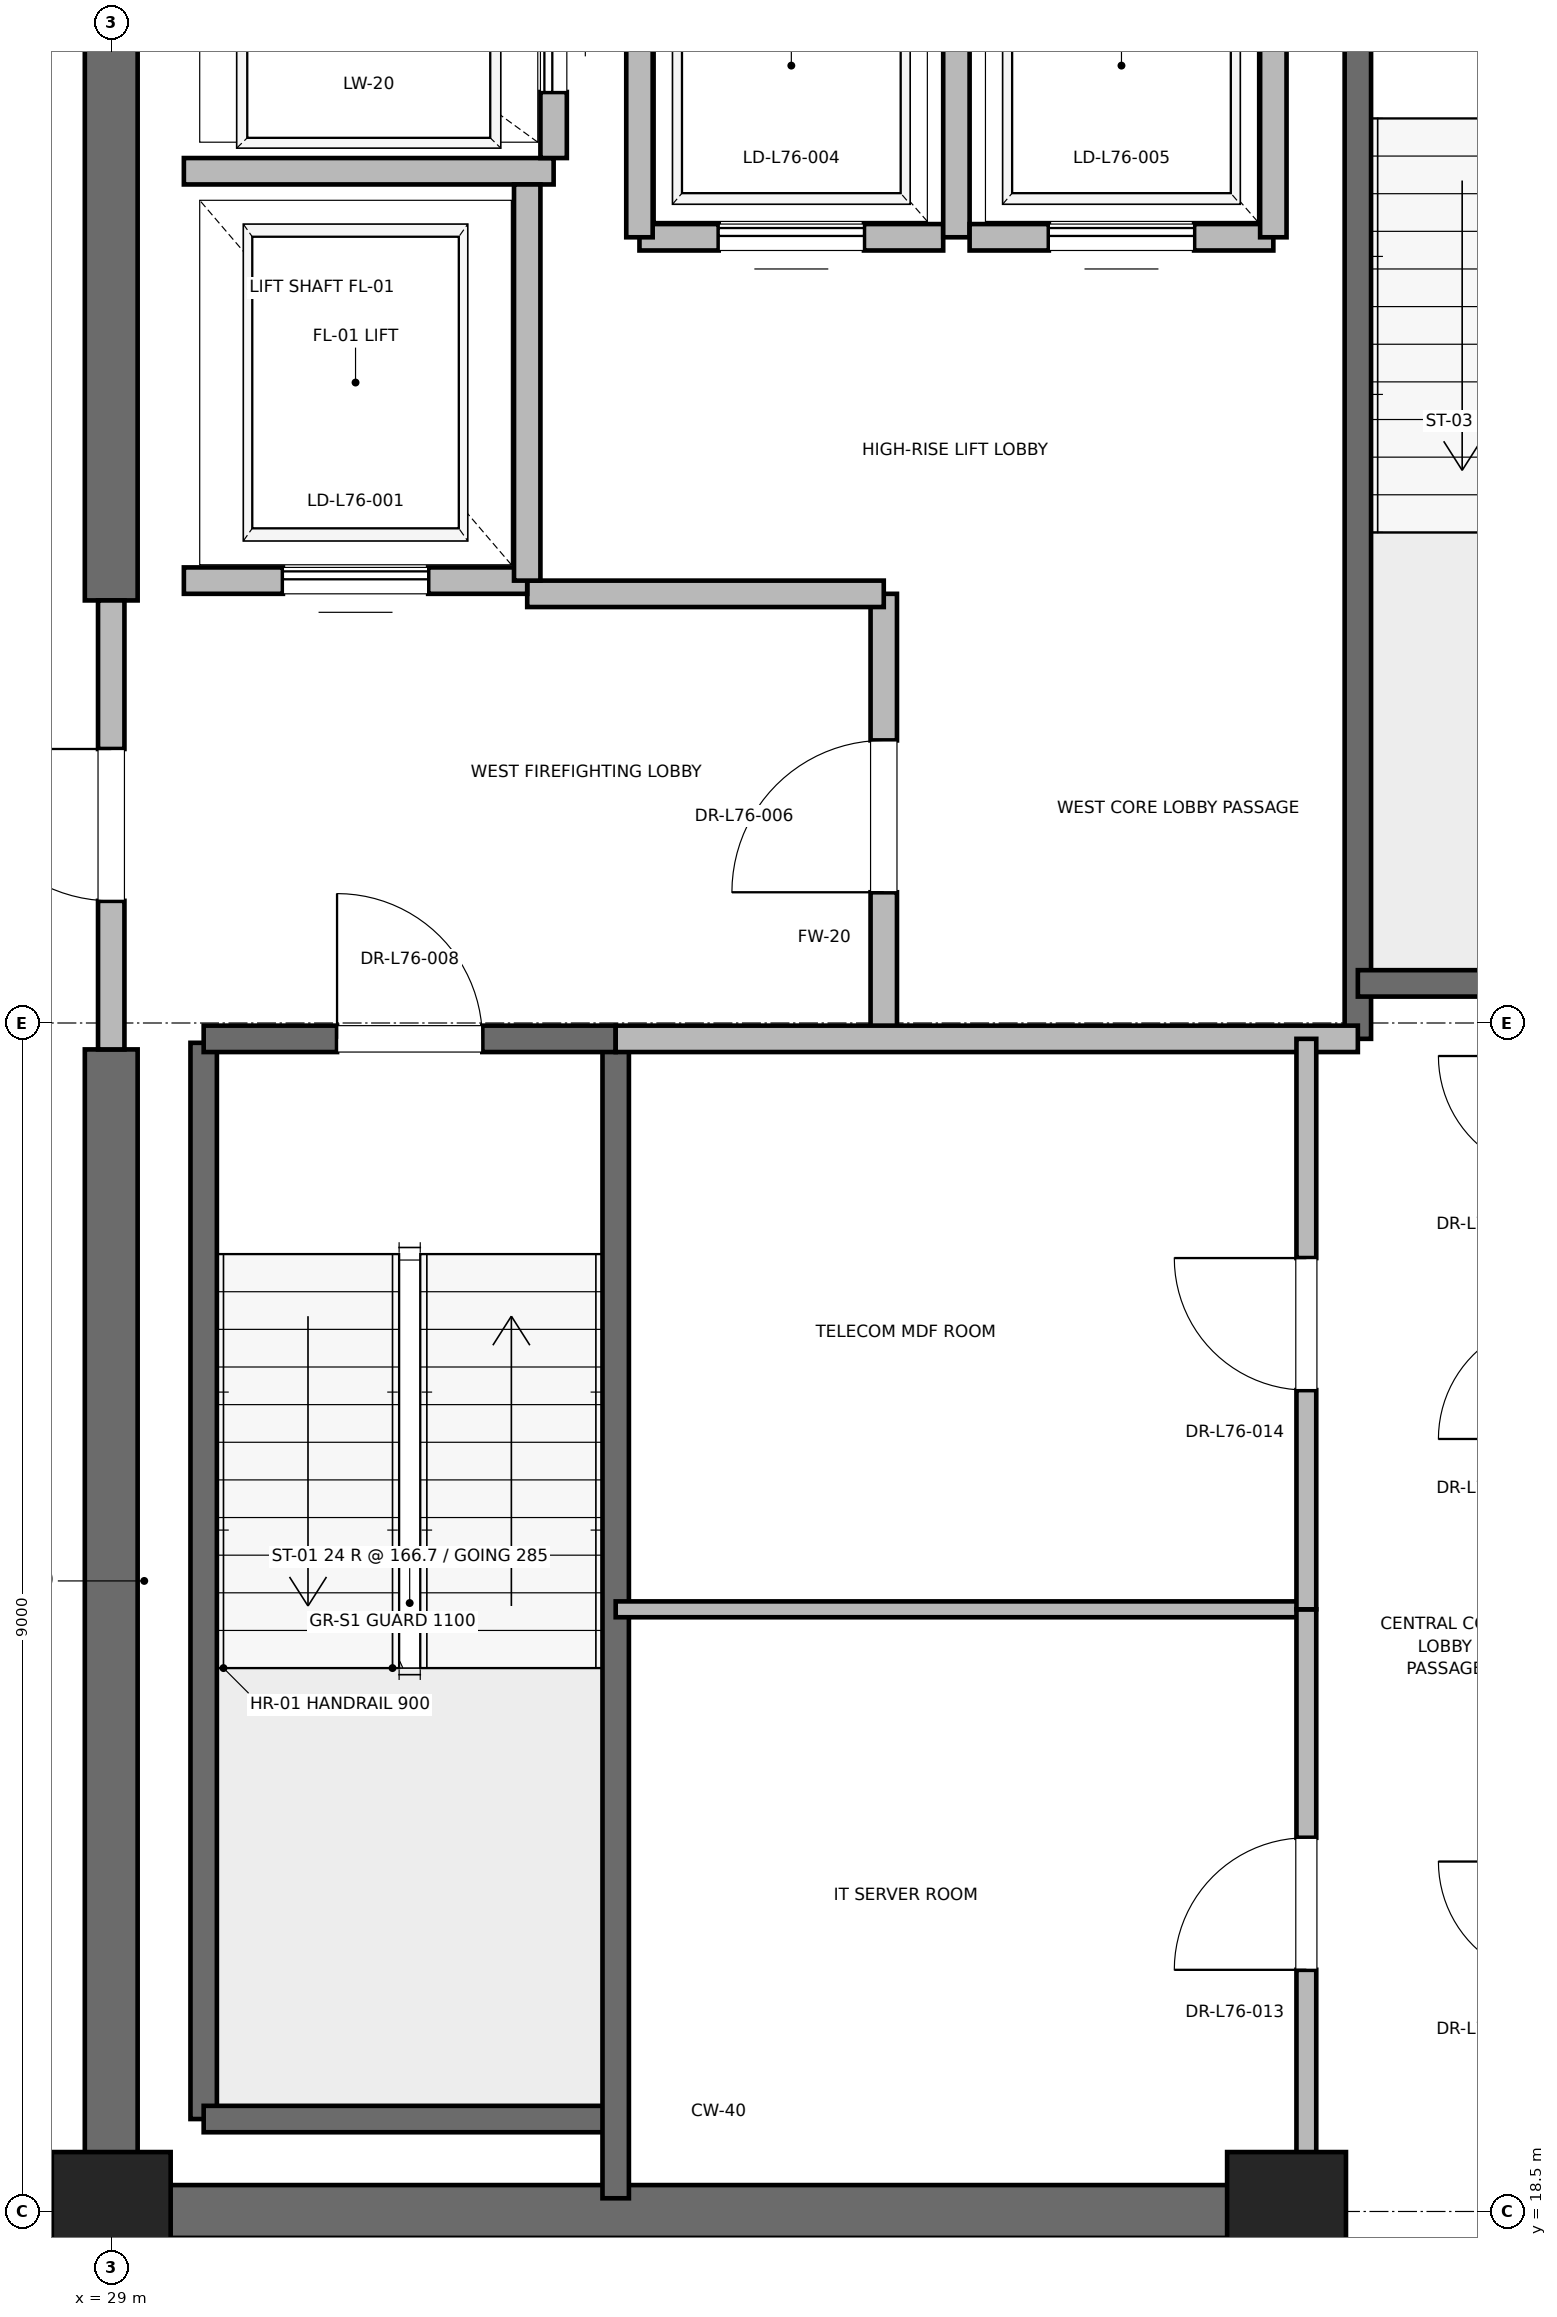
"""IFC4 building model, lengths in metres.
Left out: names, types, materials, properties, quantities, classifications, styles, units other than length and angle.
Written with IfcOpenShell. Run it as: python <this file> out.ifc"""

import sys

from ifc_helpers import new_model, si_unit, direction, frame, frame_2d, origin, origin_2d, place, context, subcontext, project, spatial, rectangle, extrude, element, fill, save


model = new_model("IFC4")
c1 = context("Model", 3, precision=1e-05, world=origin(), true_north=direction((0.0, 1.0)))
c2 = subcontext(c1, "Body", "Model", "MODEL_VIEW")
j1 = project(units=[si_unit("LENGTHUNIT", "METRE"), si_unit("PLANEANGLEUNIT", "RADIAN")], contexts=[c1])
p1 = place(None, origin())
s1 = spatial("IfcSite", under=j1, at=p1, CompositionType="ELEMENT")
p2 = place(p1, origin())
s2 = spatial("IfcBuilding", under=s1, at=p2, CompositionType="ELEMENT")
p3 = place(p2, frame((0.0, 0.0, 326.8)))
s3 = spatial("IfcBuildingStorey", under=s2, at=p3, CompositionType="ELEMENT", Elevation=326.8)
for number, where, z_axis, x_axis in (
    (1, (29.0, 18.5, 0.0), (0.0, 0.0, 1.0), (1.0, 0.0, 0.0)),
    (2, (37.9, 18.5, 0.0), (0.0, 0.0, 1.0), (1.0, 0.0, 0.0)),
):
    element("IfcColumn", number, at=place(p3, frame(where, z_axis=z_axis, x_axis=x_axis)), inside=s3, PredefinedType="PILASTER", context=c2, shape_type="SweptSolid", body=[
        extrude(rectangle(XDim=0.9, YDim=0.9, at=origin_2d()), origin(), (0.0, 0.0, 1.0), 4.0),
    ])
p4 = place(p3, frame((29.0, 18.5, 0.0), z_axis=(0.0, 0.0, 1.0), x_axis=(1.0, 0.0, 0.0)))
e3 = element("IfcWall", 3, at=p4, inside=s3, PredefinedType="SHEAR", context=c2, shape_type="SweptSolid", body=[
    extrude(rectangle(XDim=9.2, YDim=0.4, at=frame_2d((4.6, 0.0))), origin(), (0.0, 0.0, 1.0), 3.785),
])
p5 = place(p3, frame((29.0, 18.5, 0.0), z_axis=(0.0, 0.0, 1.0), x_axis=(0.0, 1.0, 0.0)))
e4 = element("IfcWall", 4, at=p5, inside=s3, PredefinedType="SHEAR", context=c2, shape_type="SweptSolid", body=[
    extrude(rectangle(XDim=8.8, YDim=0.4, at=frame_2d((4.4, 0.0))), origin(), (0.0, 0.0, 1.0), 3.785),
])
p6 = place(p3, frame((29.0, 30.7, 0.0), z_axis=(0.0, 0.0, 1.0), x_axis=(0.0, 1.0, 0.0)))
e5 = element("IfcWall", 5, at=p6, inside=s3, PredefinedType="SHEAR", context=c2, shape_type="SweptSolid", body=[
    extrude(rectangle(XDim=5.8, YDim=0.4, at=frame_2d((2.9, 0.0))), origin(), (0.0, 0.0, 1.0), 3.785),
])
p7 = place(p3, frame((29.7, 19.2, 0.0), z_axis=(0.0, 0.0, 1.0), x_axis=(0.0, 1.0, 0.0)))
e6 = element("IfcWall", 6, at=p7, inside=s3, PredefinedType="SOLIDWALL", context=c2, shape_type="SweptSolid", body=[
    extrude(rectangle(XDim=8.15, YDim=0.2, at=frame_2d((4.075, 0.0))), origin(), (0.0, 0.0, 1.0), 3.785),
])
p8 = place(p3, frame((29.7, 19.2, 0.0), z_axis=(0.0, 0.0, 1.0), x_axis=(1.0, 0.0, 0.0)))
e7 = element("IfcWall", 7, at=p8, inside=s3, PredefinedType="SOLIDWALL", context=c2, shape_type="SweptSolid", body=[
    extrude(rectangle(XDim=3.12, YDim=0.2, at=frame_2d((1.56, 0.0))), origin(), (0.0, 0.0, 1.0), 3.785),
])
p9 = place(p3, frame((32.82, 18.6, 0.0), z_axis=(0.0, 0.0, 1.0), x_axis=(0.0, 1.0, 0.0)))
e8 = element("IfcWall", 8, at=p9, inside=s3, PredefinedType="SOLIDWALL", context=c2, shape_type="SweptSolid", body=[
    extrude(rectangle(XDim=8.78, YDim=0.2, at=frame_2d((4.39, 0.0))), origin(), (0.0, 0.0, 1.0), 3.785),
])
p10 = place(p3, frame((29.7, 27.38, 0.0), z_axis=(0.0, 0.0, 1.0), x_axis=(1.0, 0.0, 0.0)))
e9 = element("IfcWall", 9, at=p10, inside=s3, PredefinedType="SOLIDWALL", context=c2, shape_type="SweptSolid", body=[
    extrude(rectangle(XDim=3.12, YDim=0.2, at=frame_2d((1.56, 0.0))), origin(), (0.0, 0.0, 1.0), 3.785),
])
p11 = place(p10, frame((1.01, 0.0, 0.0)))
e10 = element("IfcOpeningElement", 10, at=p11, cuts=e9, PredefinedType="OPENING", context=c2, shape_type="SweptSolid", body=[
    extrude(rectangle(XDim=1.1, YDim=2.15, at=frame_2d((0.55, 1.075))), frame((0.0, 0.1, 0.0), z_axis=(0.0, -1.0, 0.0), x_axis=(1.0, 0.0, 0.0)), (0.0, 0.0, 1.0), 0.2),
])
p12 = place(p3, frame((38.44, 27.38, 0.0), z_axis=(0.0, 0.0, 1.0), x_axis=(0.0, 1.0, 0.0)))
e11 = element("IfcWall", 11, at=p12, inside=s3, PredefinedType="SOLIDWALL", context=c2, shape_type="SweptSolid", body=[
    extrude(rectangle(XDim=8.87, YDim=0.2, at=frame_2d((4.435, 0.0))), origin(), (0.0, 0.0, 1.0), 3.785),
])
p13 = place(p3, frame((38.44, 27.8, 0.0), z_axis=(0.0, 0.0, 1.0), x_axis=(1.0, 0.0, 0.0)))
e12 = element("IfcWall", 12, at=p13, inside=s3, PredefinedType="SOLIDWALL", context=c2, shape_type="SweptSolid", body=[
    extrude(rectangle(XDim=3.32, YDim=0.2, at=frame_2d((1.66, 0.0))), origin(), (0.0, 0.0, 1.0), 3.785),
])
p14 = place(p3, frame((34.85, 27.38, 0.0), z_axis=(0.0, 0.0, 1.0), x_axis=(0.0, 1.0, 0.0)))
e13 = element("IfcWall", 13, at=p14, inside=s3, PredefinedType="PARTITIONING", context=c2, shape_type="SweptSolid", body=[
    extrude(rectangle(XDim=3.37, YDim=0.2, at=frame_2d((1.685, 0.0))), origin(), (0.0, 0.0, 1.0), 3.785),
])
p15 = place(p14, frame((1.11, 0.0, 0.0)))
e14 = element("IfcOpeningElement", 14, at=p15, cuts=e13, PredefinedType="OPENING", context=c2, shape_type="SweptSolid", body=[
    extrude(rectangle(XDim=1.15, YDim=2.2, at=frame_2d((0.575, 1.1))), frame((0.0, 0.1, 0.0), z_axis=(0.0, -1.0, 0.0), x_axis=(1.0, 0.0, 0.0)), (0.0, 0.0, 1.0), 0.2),
])
p16 = place(p3, frame((29.0, 27.3, 0.0), z_axis=(0.0, 0.0, 1.0), x_axis=(0.0, 1.0, 0.0)))
e15 = element("IfcWall", 15, at=p16, inside=s3, PredefinedType="PARTITIONING", context=c2, shape_type="SweptSolid", body=[
    extrude(rectangle(XDim=3.4, YDim=0.2, at=frame_2d((1.7, 0.0))), origin(), (0.0, 0.0, 1.0), 2.865),
])
p17 = place(p16, frame((1.125, 0.0, 0.0)))
e16 = element("IfcOpeningElement", 16, at=p17, cuts=e15, PredefinedType="OPENING", context=c2, shape_type="SweptSolid", body=[
    extrude(rectangle(XDim=1.15, YDim=2.2, at=frame_2d((0.575, 1.1))), frame((0.0, 0.1, 0.0), z_axis=(0.0, -1.0, 0.0), x_axis=(1.0, 0.0, 0.0)), (0.0, 0.0, 1.0), 0.2),
])
p18 = place(p3, frame((32.82, 27.38, 0.0), z_axis=(0.0, 0.0, 1.0), x_axis=(1.0, 0.0, 0.0)))
e17 = element("IfcWall", 17, at=p18, inside=s3, PredefinedType="PARTITIONING", context=c2, shape_type="SweptSolid", body=[
    extrude(rectangle(XDim=5.62, YDim=0.2, at=frame_2d((2.81, 0.0))), origin(), (0.0, 0.0, 1.0), 3.785),
])
p19 = place(p3, frame((32.15, 30.75, 0.0), z_axis=(0.0, 0.0, 1.0), x_axis=(1.0, 0.0, 0.0)))
e18 = element("IfcWall", 18, at=p19, inside=s3, PredefinedType="PARTITIONING", context=c2, shape_type="SweptSolid", body=[
    extrude(rectangle(XDim=2.7, YDim=0.2, at=frame_2d((1.35, 0.0))), origin(), (0.0, 0.0, 1.0), 3.785),
])
p20 = place(p3, frame((29.55, 30.85, 0.0), z_axis=(0.0, 0.0, 1.0), x_axis=(1.0, 0.0, 0.0)))
e19 = element("IfcWall", 19, at=p20, inside=s3, PredefinedType="SOLIDWALL", context=c2, shape_type="SweptSolid", body=[
    extrude(rectangle(XDim=2.6, YDim=0.2, at=frame_2d((1.3, 0.0))), origin(), (0.0, 0.0, 1.0), 2.865),
])
p21 = place(p20, frame((0.75, 0.0, 0.0)))
e20 = element("IfcOpeningElement", 20, at=p21, cuts=e19, PredefinedType="OPENING", context=c2, shape_type="SweptSolid", body=[
    extrude(rectangle(XDim=1.1, YDim=2.2, at=frame_2d((0.55, 1.1))), frame((0.0, 0.1, 0.0), z_axis=(0.0, -1.0, 0.0), x_axis=(1.0, 0.0, 0.0)), (0.0, 0.0, 1.0), 0.2),
])
p22 = place(p3, frame((29.55, 33.95, 0.0), z_axis=(0.0, 0.0, 1.0), x_axis=(1.0, 0.0, 0.0)))
e21 = element("IfcWall", 21, at=p22, inside=s3, PredefinedType="SOLIDWALL", context=c2, shape_type="SweptSolid", body=[
    extrude(rectangle(XDim=2.8, YDim=0.2, at=frame_2d((1.4, 0.0))), origin(), (0.0, 0.0, 1.0), 3.785),
])
p23 = place(p3, frame((32.15, 30.85, 0.0), z_axis=(0.0, 0.0, 1.0), x_axis=(0.0, 1.0, 0.0)))
e22 = element("IfcWall", 22, at=p23, inside=s3, PredefinedType="SOLIDWALL", context=c2, shape_type="SweptSolid", body=[
    extrude(rectangle(XDim=3.0, YDim=0.2, at=frame_2d((1.5, 0.0))), origin(), (0.0, 0.0, 1.0), 3.785),
])
p24 = place(p3, frame((32.35, 34.05, 0.0), z_axis=(0.0, 0.0, 1.0), x_axis=(0.0, 1.0, 0.0)))
e23 = element("IfcWall", 23, at=p24, inside=s3, PredefinedType="SOLIDWALL", context=c2, shape_type="SweptSolid", body=[
    extrude(rectangle(XDim=2.1, YDim=0.2, at=frame_2d((1.05, 0.0))), origin(), (0.0, 0.0, 1.0), 3.785),
])
p25 = place(p24, frame((0.5, 0.0, 0.0)))
e24 = element("IfcOpeningElement", 24, at=p25, cuts=e23, PredefinedType="OPENING", context=c2, shape_type="SweptSolid", body=[
    extrude(rectangle(XDim=1.1, YDim=2.2, at=frame_2d((0.55, 1.1))), frame((0.0, 0.1, 0.0), z_axis=(0.0, -1.0, 0.0), x_axis=(1.0, 0.0, 0.0)), (0.0, 0.0, 1.0), 0.2),
])
p26 = place(p3, frame((33.0, 33.45, 0.0), z_axis=(0.0, 0.0, 1.0), x_axis=(1.0, 0.0, 0.0)))
e25 = element("IfcWall", 25, at=p26, inside=s3, PredefinedType="SOLIDWALL", context=c2, shape_type="SweptSolid", body=[
    extrude(rectangle(XDim=2.3, YDim=0.2, at=frame_2d((1.15, 0.0))), origin(), (0.0, 0.0, 1.0), 3.785),
])
p27 = place(p26, frame((0.6, 0.0, 0.0)))
e26 = element("IfcOpeningElement", 26, at=p27, cuts=e25, PredefinedType="OPENING", context=c2, shape_type="SweptSolid", body=[
    extrude(rectangle(XDim=1.1, YDim=2.2, at=frame_2d((0.55, 1.1))), frame((0.0, 0.1, 0.0), z_axis=(0.0, -1.0, 0.0), x_axis=(1.0, 0.0, 0.0)), (0.0, 0.0, 1.0), 0.2),
])
p28 = place(p3, frame((33.0, 36.05, 0.0), z_axis=(0.0, 0.0, 1.0), x_axis=(0.0, -1.0, 0.0)))
e27 = element("IfcWall", 27, at=p28, inside=s3, PredefinedType="SOLIDWALL", context=c2, shape_type="SweptSolid", body=[
    extrude(rectangle(XDim=2.6, YDim=0.2, at=frame_2d((1.3, 0.0))), origin(), (0.0, 0.0, 1.0), 3.785),
])
p29 = place(p3, frame((35.4, 33.45, 0.0), z_axis=(0.0, 0.0, 1.0), x_axis=(0.0, 1.0, 0.0)))
e28 = element("IfcWall", 28, at=p29, inside=s3, PredefinedType="SOLIDWALL", context=c2, shape_type="SweptSolid", body=[
    extrude(rectangle(XDim=2.6, YDim=0.2, at=frame_2d((1.3, 0.0))), origin(), (0.0, 0.0, 1.0), 2.865),
])
p30 = place(p3, frame((35.5, 33.45, 0.0), z_axis=(0.0, 0.0, 1.0), x_axis=(1.0, 0.0, 0.0)))
e29 = element("IfcWall", 29, at=p30, inside=s3, PredefinedType="SOLIDWALL", context=c2, shape_type="SweptSolid", body=[
    extrude(rectangle(XDim=2.3, YDim=0.2, at=frame_2d((1.15, 0.0))), origin(), (0.0, 0.0, 1.0), 3.785),
])
p31 = place(p30, frame((0.6, 0.0, 0.0)))
e30 = element("IfcOpeningElement", 30, at=p31, cuts=e29, PredefinedType="OPENING", context=c2, shape_type="SweptSolid", body=[
    extrude(rectangle(XDim=1.1, YDim=2.2, at=frame_2d((0.55, 1.1))), frame((0.0, 0.1, 0.0), z_axis=(0.0, -1.0, 0.0), x_axis=(1.0, 0.0, 0.0)), (0.0, 0.0, 1.0), 0.2),
])
p32 = place(p3, frame((37.8, 33.45, 0.0), z_axis=(0.0, 0.0, 1.0), x_axis=(0.0, 1.0, 0.0)))
e31 = element("IfcWall", 31, at=p32, inside=s3, PredefinedType="SOLIDWALL", context=c2, shape_type="SweptSolid", body=[
    extrude(rectangle(XDim=2.6, YDim=0.2, at=frame_2d((1.3, 0.0))), origin(), (0.0, 0.0, 1.0), 2.865),
])
p33 = place(p3, frame((32.82, 23.06, 0.0), z_axis=(0.0, 0.0, 1.0), x_axis=(1.0, 0.0, 0.0)))
e32 = element("IfcWall", 32, at=p33, inside=s3, PredefinedType="PARTITIONING", context=c2, shape_type="SweptSolid", body=[
    extrude(rectangle(XDim=5.23, YDim=0.12, at=frame_2d((2.615, 0.0))), origin(), (0.0, 0.0, 1.0), 2.85),
])
p34 = place(p3, frame((38.05, 18.6, 0.0), z_axis=(0.0, 0.0, 1.0), x_axis=(0.0, 1.0, 0.0)))
e33 = element("IfcWall", 33, at=p34, inside=s3, PredefinedType="PARTITIONING", context=c2, shape_type="SweptSolid", body=[
    extrude(rectangle(XDim=4.46, YDim=0.15, at=frame_2d((2.23, 0.0))), origin(), (0.0, 0.0, 1.0), 2.85),
])
p35 = place(p34, frame((1.73, 0.0, 0.0)))
e34 = element("IfcOpeningElement", 34, at=p35, cuts=e33, PredefinedType="OPENING", context=c2, shape_type="SweptSolid", body=[
    extrude(rectangle(XDim=1.0, YDim=2.15, at=frame_2d((0.5, 1.075))), frame((0.0, 0.075, 0.0), z_axis=(0.0, -1.0, 0.0), x_axis=(1.0, 0.0, 0.0)), (0.0, 0.0, 1.0), 0.15),
])
p36 = place(p3, frame((38.05, 23.06, 0.0), z_axis=(0.0, 0.0, 1.0), x_axis=(0.0, 1.0, 0.0)))
e35 = element("IfcWall", 35, at=p36, inside=s3, PredefinedType="PARTITIONING", context=c2, shape_type="SweptSolid", body=[
    extrude(rectangle(XDim=4.32, YDim=0.15, at=frame_2d((2.16, 0.0))), origin(), (0.0, 0.0, 1.0), 2.85),
])
p37 = place(p36, frame((1.66, 0.0, 0.0)))
e36 = element("IfcOpeningElement", 36, at=p37, cuts=e35, PredefinedType="OPENING", context=c2, shape_type="SweptSolid", body=[
    extrude(rectangle(XDim=1.0, YDim=2.15, at=frame_2d((0.5, 1.075))), frame((0.0, 0.075, 0.0), z_axis=(0.0, -1.0, 0.0), x_axis=(1.0, 0.0, 0.0)), (0.0, 0.0, 1.0), 0.15),
])
p38 = place(p11, origin())
e37 = element("IfcDoor", 37, at=p38, inside=s3, OperationType="SINGLE_SWING_LEFT", PredefinedType="DOOR", context=c2, shape_type="SweptSolid", body=[
    extrude(rectangle(XDim=1.1, YDim=2.15, at=frame_2d((0.55, 1.075))), frame((0.0, 0.025, 0.0), z_axis=(0.0, -1.0, 0.0), x_axis=(1.0, 0.0, 0.0)), (0.0, 0.0, 1.0), 0.05),
])
fill(e10, e37)
p39 = place(p15, origin())
e38 = element("IfcDoor", 38, at=p39, inside=s3, OperationType="SINGLE_SWING_LEFT", PredefinedType="DOOR", context=c2, shape_type="SweptSolid", body=[
    extrude(rectangle(XDim=1.15, YDim=2.2, at=frame_2d((0.575, 1.1))), frame((0.0, 0.025, 0.0), z_axis=(0.0, -1.0, 0.0), x_axis=(1.0, 0.0, 0.0)), (0.0, 0.0, 1.0), 0.05),
])
fill(e14, e38)
p40 = place(p17, origin())
e39 = element("IfcDoor", 39, at=p40, inside=s3, OperationType="SINGLE_SWING_RIGHT", PredefinedType="DOOR", context=c2, shape_type="SweptSolid", body=[
    extrude(rectangle(XDim=1.15, YDim=2.2, at=frame_2d((0.575, 1.1))), frame((0.0, 0.025, 0.0), z_axis=(0.0, -1.0, 0.0), x_axis=(1.0, 0.0, 0.0)), (0.0, 0.0, 1.0), 0.05),
])
fill(e16, e39)
p41 = place(p21, origin())
e40 = element("IfcDoor", 40, at=p41, inside=s3, OperationType="SLIDING_TO_RIGHT", PredefinedType="DOOR", context=c2, shape_type="SweptSolid", body=[
    extrude(rectangle(XDim=1.1, YDim=2.2, at=frame_2d((0.55, 1.1))), frame((0.0, 0.025, 0.0), z_axis=(0.0, -1.0, 0.0), x_axis=(1.0, 0.0, 0.0)), (0.0, 0.0, 1.0), 0.05),
])
fill(e20, e40)
p42 = place(p25, origin())
e41 = element("IfcDoor", 41, at=p42, inside=s3, OperationType="SLIDING_TO_RIGHT", PredefinedType="DOOR", context=c2, shape_type="SweptSolid", body=[
    extrude(rectangle(XDim=1.1, YDim=2.2, at=frame_2d((0.55, 1.1))), frame((0.0, 0.025, 0.0), z_axis=(0.0, -1.0, 0.0), x_axis=(1.0, 0.0, 0.0)), (0.0, 0.0, 1.0), 0.05),
])
fill(e24, e41)
p43 = place(p27, origin())
e42 = element("IfcDoor", 42, at=p43, inside=s3, OperationType="SLIDING_TO_RIGHT", PredefinedType="DOOR", context=c2, shape_type="SweptSolid", body=[
    extrude(rectangle(XDim=1.1, YDim=2.2, at=frame_2d((0.55, 1.1))), frame((0.0, 0.025, 0.0), z_axis=(0.0, -1.0, 0.0), x_axis=(1.0, 0.0, 0.0)), (0.0, 0.0, 1.0), 0.05),
])
fill(e26, e42)
p44 = place(p31, origin())
e43 = element("IfcDoor", 43, at=p44, inside=s3, OperationType="SLIDING_TO_RIGHT", PredefinedType="DOOR", context=c2, shape_type="SweptSolid", body=[
    extrude(rectangle(XDim=1.1, YDim=2.2, at=frame_2d((0.55, 1.1))), frame((0.0, 0.025, 0.0), z_axis=(0.0, -1.0, 0.0), x_axis=(1.0, 0.0, 0.0)), (0.0, 0.0, 1.0), 0.05),
])
fill(e30, e43)
p45 = place(p35, origin())
e44 = element("IfcDoor", 44, at=p45, inside=s3, OperationType="SINGLE_SWING_LEFT", PredefinedType="DOOR", context=c2, shape_type="SweptSolid", body=[
    extrude(rectangle(XDim=1.0, YDim=2.15, at=frame_2d((0.5, 1.075))), frame((0.0, 0.025, 0.0), z_axis=(0.0, -1.0, 0.0), x_axis=(1.0, 0.0, 0.0)), (0.0, 0.0, 1.0), 0.05),
])
fill(e34, e44)
p46 = place(p37, origin())
e45 = element("IfcDoor", 45, at=p46, inside=s3, OperationType="SINGLE_SWING_RIGHT", PredefinedType="DOOR", context=c2, shape_type="SweptSolid", body=[
    extrude(rectangle(XDim=1.0, YDim=2.15, at=frame_2d((0.5, 1.075))), frame((0.0, 0.025, 0.0), z_axis=(0.0, -1.0, 0.0), x_axis=(1.0, 0.0, 0.0)), (0.0, 0.0, 1.0), 0.05),
])
fill(e36, e45)
save(model, sys.argv[1])
